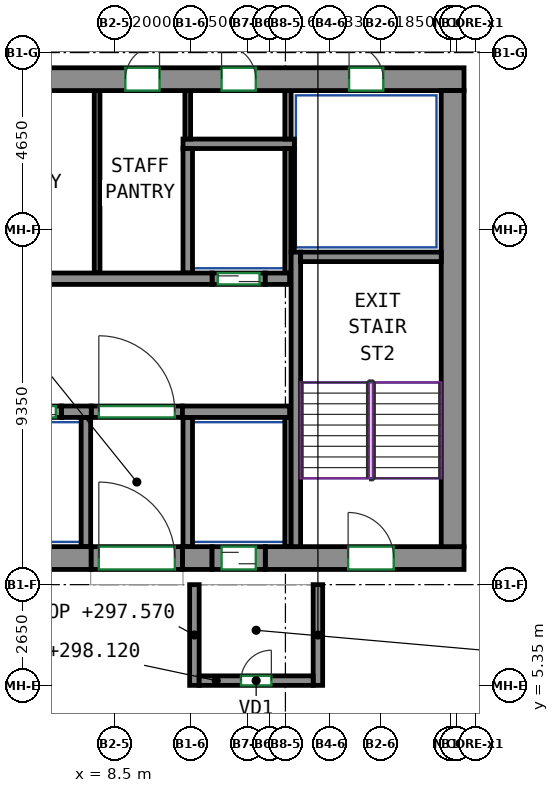
"""IFC4 building model, lengths in metres.
Left out: names, types, materials, properties, quantities, classifications, styles, units other than length and angle.
Written with IfcOpenShell. Run it as: python <this file> out.ifc"""

import sys

from ifc_helpers import new_model, si_unit, direction, frame, frame_2d, origin, place, context, subcontext, project, spatial, rectangle, extrude, source, transform, mapped, element, fill, save


model = new_model("IFC4")
c1 = context("Model", 3, precision=1e-05, world=origin(), true_north=direction((0.0, 1.0)))
c2 = subcontext(c1, "Body", "Model", "MODEL_VIEW")
j1 = project(units=[si_unit("LENGTHUNIT", "METRE"), si_unit("PLANEANGLEUNIT", "RADIAN")], contexts=[c1])
p1 = place(None, origin())
s1 = spatial("IfcSite", under=j1, at=p1, CompositionType="ELEMENT")
p2 = place(p1, origin())
s2 = spatial("IfcBuilding", under=s1, at=p2, CompositionType="ELEMENT")
p3 = place(p2, frame((0.0, 0.0, 295.0)))
s3 = spatial("IfcBuildingStorey", under=s2, at=p3, CompositionType="ELEMENT", Elevation=295.0)
m1 = source(origin(), c2, "Body", "SweptSolid", [
    extrude(rectangle(XDim=14.18, YDim=0.6, at=frame_2d((7.09, 0.0))), origin(), (0.0, 0.0, 1.0), 3.12),
])
p4 = place(p3, frame((-6.29, 8.7, 0.0), z_axis=(0.0, 0.0, 1.0), x_axis=(1.0, 0.0, 0.0)))
e1 = element("IfcWall", 1, at=p4, inside=s3, PredefinedType="SHEAR", context=c2, shape_type="MappedRepresentation", body=[
    mapped(m1, transform((0.0, 0.0, 0.0))),
])
m2 = source(origin(), c2, "Body", "SweptSolid", [
    extrude(rectangle(XDim=0.78, YDim=0.6, at=frame_2d((0.39, 0.0))), origin(), (0.0, 0.0, 1.0), 3.12),
])
p5 = place(p3, frame((10.29, 8.7, 0.0), z_axis=(0.0, 0.0, 1.0), x_axis=(1.0, 0.0, 0.0)))
e2 = element("IfcWall", 2, at=p5, inside=s3, PredefinedType="SHEAR", context=c2, shape_type="MappedRepresentation", body=[
    mapped(m2, transform((0.0, 0.0, 0.0))),
])
m3 = source(origin(), c2, "Body", "SweptSolid", [
    extrude(rectangle(XDim=5.23, YDim=0.6, at=frame_2d((2.615, 0.0))), origin(), (0.0, 0.0, 1.0), 3.12),
])
p6 = place(p3, frame((12.47, 8.7, 0.0), z_axis=(0.0, 0.0, 1.0), x_axis=(1.0, 0.0, 0.0)))
e3 = element("IfcWall", 3, at=p6, inside=s3, PredefinedType="SHEAR", context=c2, shape_type="MappedRepresentation", body=[
    mapped(m3, transform((0.0, 0.0, 0.0))),
])
p7 = place(p6, frame((2.18, 0.0, 0.0)))
e4 = element("IfcOpeningElement", 4, at=p7, cuts=e3, PredefinedType="OPENING", context=c2, shape_type="SweptSolid", body=[
    extrude(rectangle(XDim=1.2, YDim=2.1, at=frame_2d((0.6, 1.05))), frame((0.0, 0.31, 0.0), z_axis=(0.0, -1.0, 0.0), x_axis=(1.0, 0.0, 0.0)), (0.0, 0.0, 1.0), 0.62),
])
m4 = source(origin(), c2, "Body", "SweptSolid", [
    extrude(rectangle(XDim=33.3, YDim=0.6, at=frame_2d((16.65, 0.0))), origin(), (0.0, 0.0, 1.0), 3.12),
])
p8 = place(p3, frame((-15.6, 21.3, 0.0), z_axis=(0.0, 0.0, 1.0), x_axis=(1.0, 0.0, 0.0)))
e5 = element("IfcWall", 5, at=p8, inside=s3, PredefinedType="SHEAR", context=c2, shape_type="MappedRepresentation", body=[
    mapped(m4, transform((0.0, 0.0, 0.0))),
])
p9 = place(p8, frame((6.431, 0.0, 0.0)))
e6 = element("IfcOpeningElement", 6, at=p9, cuts=e5, PredefinedType="OPENING", context=c2, shape_type="SweptSolid", body=[
    extrude(rectangle(XDim=0.9, YDim=2.1, at=frame_2d((0.45, 1.05))), frame((0.0, 0.31, 0.0), z_axis=(0.0, -1.0, 0.0), x_axis=(1.0, 0.0, 0.0)), (0.0, 0.0, 1.0), 0.62),
])
p10 = place(p8, frame((11.738, 0.0, 0.0)))
e7 = element("IfcOpeningElement", 7, at=p10, cuts=e5, PredefinedType="OPENING", context=c2, shape_type="SweptSolid", body=[
    extrude(rectangle(XDim=0.9, YDim=2.1, at=frame_2d((0.45, 1.05))), frame((0.0, 0.31, 0.0), z_axis=(0.0, -1.0, 0.0), x_axis=(1.0, 0.0, 0.0)), (0.0, 0.0, 1.0), 0.62),
])
p11 = place(p8, frame((17.165, 0.0, 0.0)))
e8 = element("IfcOpeningElement", 8, at=p11, cuts=e5, PredefinedType="OPENING", context=c2, shape_type="SweptSolid", body=[
    extrude(rectangle(XDim=0.9, YDim=2.1, at=frame_2d((0.45, 1.05))), frame((0.0, 0.31, 0.0), z_axis=(0.0, -1.0, 0.0), x_axis=(1.0, 0.0, 0.0)), (0.0, 0.0, 1.0), 0.62),
])
p12 = place(p8, frame((21.386, 0.0, 0.0)))
e9 = element("IfcOpeningElement", 9, at=p12, cuts=e5, PredefinedType="OPENING", context=c2, shape_type="SweptSolid", body=[
    extrude(rectangle(XDim=0.9, YDim=2.1, at=frame_2d((0.45, 1.05))), frame((0.0, 0.31, 0.0), z_axis=(0.0, -1.0, 0.0), x_axis=(1.0, 0.0, 0.0)), (0.0, 0.0, 1.0), 0.62),
])
p13 = place(p8, frame((24.387, 0.0, 0.0)))
e10 = element("IfcOpeningElement", 10, at=p13, cuts=e5, PredefinedType="OPENING", context=c2, shape_type="SweptSolid", body=[
    extrude(rectangle(XDim=0.9, YDim=2.1, at=frame_2d((0.45, 1.05))), frame((0.0, 0.31, 0.0), z_axis=(0.0, -1.0, 0.0), x_axis=(1.0, 0.0, 0.0)), (0.0, 0.0, 1.0), 0.62),
])
p14 = place(p8, frame((26.92, 0.0, 0.0)))
e11 = element("IfcOpeningElement", 11, at=p14, cuts=e5, PredefinedType="OPENING", context=c2, shape_type="SweptSolid", body=[
    extrude(rectangle(XDim=0.9, YDim=2.1, at=frame_2d((0.45, 1.05))), frame((0.0, 0.31, 0.0), z_axis=(0.0, -1.0, 0.0), x_axis=(1.0, 0.0, 0.0)), (0.0, 0.0, 1.0), 0.62),
])
p15 = place(p8, frame((2.125, 0.0, 0.0)))
e12 = element("IfcOpeningElement", 12, at=p15, cuts=e5, PredefinedType="OPENING", context=c2, shape_type="SweptSolid", body=[
    extrude(rectangle(XDim=0.9, YDim=2.1, at=frame_2d((0.45, 1.05))), frame((0.0, 0.31, 0.0), z_axis=(0.0, -1.0, 0.0), x_axis=(1.0, 0.0, 0.0)), (0.0, 0.0, 1.0), 0.62),
])
p16 = place(p8, frame((30.275, 0.0, 0.0)))
e13 = element("IfcOpeningElement", 13, at=p16, cuts=e5, PredefinedType="OPENING", context=c2, shape_type="SweptSolid", body=[
    extrude(rectangle(XDim=0.9, YDim=2.1, at=frame_2d((0.45, 1.05))), frame((0.0, 0.31, 0.0), z_axis=(0.0, -1.0, 0.0), x_axis=(1.0, 0.0, 0.0)), (0.0, 0.0, 1.0), 0.62),
])
m5 = source(origin(), c2, "Body", "SweptSolid", [
    extrude(rectangle(XDim=12.0, YDim=0.6, at=frame_2d((6.0, 0.0))), origin(), (0.0, 0.0, 1.0), 3.12),
])
p17 = place(p3, frame((17.4, 9.0, 0.0), z_axis=(0.0, 0.0, 1.0), x_axis=(0.0, 1.0, 0.0)))
e14 = element("IfcWall", 14, at=p17, inside=s3, PredefinedType="SHEAR", context=c2, shape_type="MappedRepresentation", body=[
    mapped(m5, transform((0.0, 0.0, 0.0))),
])
m6 = source(origin(), c2, "Body", "SweptSolid", [
    extrude(rectangle(XDim=7.75, YDim=0.25, at=frame_2d((3.875, 0.0))), origin(), (0.0, 0.0, 1.0), 3.12),
])
p18 = place(p3, frame((13.275, 9.0, 0.0), z_axis=(0.0, 0.0, 1.0), x_axis=(0.0, 1.0, 0.0)))
e15 = element("IfcWall", 15, at=p18, inside=s3, PredefinedType="SHEAR", context=c2, shape_type="MappedRepresentation", body=[
    mapped(m6, transform((0.0, 0.0, 0.0))),
])
m7 = source(origin(), c2, "Body", "SweptSolid", [
    extrude(rectangle(XDim=3.7, YDim=0.25, at=frame_2d((1.85, 0.0))), origin(), (0.0, 0.0, 1.0), 3.12),
])
p19 = place(p3, frame((13.4, 16.625, 0.0), z_axis=(0.0, 0.0, 1.0), x_axis=(1.0, 0.0, 0.0)))
e16 = element("IfcWall", 16, at=p19, inside=s3, PredefinedType="SHEAR", context=c2, shape_type="MappedRepresentation", body=[
    mapped(m7, transform((0.0, 0.0, 0.0))),
])
m8 = source(origin(), c2, "Body", "SweptSolid", [
    extrude(rectangle(XDim=0.78, YDim=0.3, at=frame_2d((0.39, 0.0))), origin(), (0.0, 0.0, 1.0), 3.12),
])
p20 = place(p3, frame((7.11, 12.55, 0.0), z_axis=(0.0, 0.0, 1.0), x_axis=(1.0, 0.0, 0.0)))
e17 = element("IfcWall", 17, at=p20, inside=s3, PredefinedType="SHEAR", context=c2, shape_type="MappedRepresentation", body=[
    mapped(m8, transform((0.0, 0.0, 0.0))),
])
m9 = source(origin(), c2, "Body", "SweptSolid", [
    extrude(rectangle(XDim=2.82, YDim=0.3, at=frame_2d((1.41, 0.0))), origin(), (0.0, 0.0, 1.0), 3.12),
])
p21 = place(p3, frame((10.29, 12.55, 0.0), z_axis=(0.0, 0.0, 1.0), x_axis=(1.0, 0.0, 0.0)))
e18 = element("IfcWall", 18, at=p21, inside=s3, PredefinedType="SHEAR", context=c2, shape_type="MappedRepresentation", body=[
    mapped(m9, transform((0.0, 0.0, 0.0))),
])
m10 = source(origin(), c2, "Body", "SweptSolid", [
    extrude(rectangle(XDim=22.08, YDim=0.3, at=frame_2d((11.04, 0.0))), origin(), (0.0, 0.0, 1.0), 3.12),
])
p22 = place(p3, frame((-11.01, 16.05, 0.0), z_axis=(0.0, 0.0, 1.0), x_axis=(1.0, 0.0, 0.0)))
e19 = element("IfcWall", 19, at=p22, inside=s3, PredefinedType="SHEAR", context=c2, shape_type="MappedRepresentation", body=[
    mapped(m10, transform((0.0, 0.0, 0.0))),
])
m11 = source(origin(), c2, "Body", "SweptSolid", [
    extrude(rectangle(XDim=0.64, YDim=0.3, at=frame_2d((0.32, 0.0))), origin(), (0.0, 0.0, 1.0), 3.12),
])
p23 = place(p3, frame((12.47, 16.05, 0.0), z_axis=(0.0, 0.0, 1.0), x_axis=(1.0, 0.0, 0.0)))
e20 = element("IfcWall", 20, at=p23, inside=s3, PredefinedType="SHEAR", context=c2, shape_type="MappedRepresentation", body=[
    mapped(m11, transform((0.0, 0.0, 0.0))),
])
m12 = source(origin(), c2, "Body", "SweptSolid", [
    extrude(rectangle(XDim=1.4, YDim=0.3, at=frame_2d((0.7, 0.0))), origin(), (0.0, 0.0, 1.0), 3.12),
])
p24 = place(p3, frame((5.71, 12.55, 0.0), z_axis=(0.0, 0.0, 1.0), x_axis=(1.0, 0.0, 0.0)))
e21 = element("IfcWall", 21, at=p24, inside=s3, PredefinedType="PARTITIONING", context=c2, shape_type="MappedRepresentation", body=[
    mapped(m12, transform((0.0, 0.0, 0.0))),
])
p25 = place(p24, frame((0.15, 0.0, 0.0)))
e22 = element("IfcOpeningElement", 22, at=p25, cuts=e21, PredefinedType="OPENING", context=c2, shape_type="SweptSolid", body=[
    extrude(rectangle(XDim=1.1, YDim=2.1, at=frame_2d((0.55, 1.05))), frame((0.0, 0.16, 0.0), z_axis=(0.0, -1.0, 0.0), x_axis=(1.0, 0.0, 0.0)), (0.0, 0.0, 1.0), 0.32),
])
m13 = source(origin(), c2, "Body", "SweptSolid", [
    extrude(rectangle(XDim=1.4, YDim=0.3, at=frame_2d((0.7, 0.0))), origin(), (0.0, 0.0, 1.0), 3.12),
])
p26 = place(p3, frame((11.07, 16.05, 0.0), z_axis=(0.0, 0.0, 1.0), x_axis=(1.0, 0.0, 0.0)))
e23 = element("IfcWall", 23, at=p26, inside=s3, PredefinedType="PARTITIONING", context=c2, shape_type="MappedRepresentation", body=[
    mapped(m13, transform((0.0, 0.0, 0.0))),
])
p27 = place(p26, frame((0.15, 0.0, 0.0)))
e24 = element("IfcOpeningElement", 24, at=p27, cuts=e23, PredefinedType="OPENING", context=c2, shape_type="SweptSolid", body=[
    extrude(rectangle(XDim=1.1, YDim=2.1, at=frame_2d((0.55, 1.05))), frame((0.0, 0.16, 0.0), z_axis=(0.0, -1.0, 0.0), x_axis=(1.0, 0.0, 0.0)), (0.0, 0.0, 1.0), 0.32),
])
m14 = source(origin(), c2, "Body", "SweptSolid", [
    extrude(rectangle(XDim=2.4, YDim=0.3, at=frame_2d((1.2, 0.0))), origin(), (0.0, 0.0, 1.0), 3.12),
])
p28 = place(p3, frame((7.89, 12.55, 0.0), z_axis=(0.0, 0.0, 1.0), x_axis=(1.0, 0.0, 0.0)))
e25 = element("IfcWall", 25, at=p28, inside=s3, PredefinedType="PARTITIONING", context=c2, shape_type="MappedRepresentation", body=[
    mapped(m14, transform((0.0, 0.0, 0.0))),
])
p29 = place(p28, frame((0.2, 0.0, 0.0)))
e26 = element("IfcOpeningElement", 26, at=p29, cuts=e25, PredefinedType="OPENING", context=c2, shape_type="SweptSolid", body=[
    extrude(rectangle(XDim=2.0, YDim=2.1, at=frame_2d((1.0, 1.05))), frame((0.0, 0.16, 0.0), z_axis=(0.0, -1.0, 0.0), x_axis=(1.0, 0.0, 0.0)), (0.0, 0.0, 1.0), 0.32),
])
m15 = source(origin(), c2, "Body", "SweptSolid", [
    extrude(rectangle(XDim=2.65, YDim=0.25, at=frame_2d((1.325, 0.0))), origin(), (0.0, 0.0, 1.0), 2.57),
])
for number, where, z_axis, x_axis in (
    (27, (10.605, 5.35, 0.0), (0.0, 0.0, 1.0), (0.0, 1.0, 0.0)),
    (28, (13.855, 5.35, 0.0), (0.0, 0.0, 1.0), (0.0, 1.0, 0.0)),
):
    element("IfcWall", number, at=place(p3, frame(where, z_axis=z_axis, x_axis=x_axis)), inside=s3, PredefinedType="PARTITIONING", context=c2, shape_type="MappedRepresentation", body=[
        mapped(m15, transform((0.0, 0.0, 0.0))),
    ])
m16 = source(origin(), c2, "Body", "SweptSolid", [
    extrude(rectangle(XDim=3.0, YDim=0.25, at=frame_2d((1.5, 0.0))), origin(), (0.0, 0.0, 1.0), 3.12),
])
p30 = place(p3, frame((10.73, 5.475, 0.0), z_axis=(0.0, 0.0, 1.0), x_axis=(1.0, 0.0, 0.0)))
e29 = element("IfcWall", 29, at=p30, inside=s3, PredefinedType="PARTITIONING", context=c2, shape_type="MappedRepresentation", body=[
    mapped(m16, transform((0.0, 0.0, 0.0))),
])
p31 = place(p30, frame((1.1, 0.0, 0.0)))
e30 = element("IfcOpeningElement", 30, at=p31, cuts=e29, PredefinedType="OPENING", context=c2, shape_type="SweptSolid", body=[
    extrude(rectangle(XDim=0.8, YDim=2.0, at=frame_2d((0.4, 1.0))), frame((0.0, 0.135, 0.0), z_axis=(0.0, -1.0, 0.0), x_axis=(1.0, 0.0, 0.0)), (0.0, 0.0, 1.0), 0.27),
])
m17 = source(origin(), c2, "Body", "SweptSolid", [
    extrude(rectangle(XDim=2.93, YDim=0.25, at=frame_2d((1.465, 0.0))), origin(), (0.0, 0.0, 1.0), 3.12),
])
p32 = place(p3, frame((10.305, 19.6, 0.0), z_axis=(0.0, 0.0, 1.0), x_axis=(1.0, 0.0, 0.0)))
e31 = element("IfcWall", 31, at=p32, inside=s3, PredefinedType="PARTITIONING", context=c2, shape_type="MappedRepresentation", body=[
    mapped(m17, transform((0.0, 0.0, 0.0))),
])
m18 = source(origin(), c2, "Body", "SweptSolid", [
    extrude(rectangle(XDim=3.275, YDim=0.165, at=frame_2d((1.638, 0.0))), origin(), (0.0, 0.0, 1.0), 3.12),
])
p33 = place(p3, frame((13.067, 16.2, 0.0), z_axis=(0.0, 0.0, 1.0), x_axis=(0.0, 1.0, 0.0)))
e32 = element("IfcWall", 32, at=p33, inside=s3, PredefinedType="PARTITIONING", context=c2, shape_type="MappedRepresentation", body=[
    mapped(m18, transform((0.0, 0.0, 0.0))),
])
m19 = source(origin(), c2, "Body", "SweptSolid", [
    extrude(rectangle(XDim=1.275, YDim=0.165, at=frame_2d((0.637, 0.0))), origin(), (0.0, 0.0, 1.0), 3.12),
])
p34 = place(p3, frame((13.067, 19.725, 0.0), z_axis=(0.0, 0.0, 1.0), x_axis=(0.0, 1.0, 0.0)))
e33 = element("IfcWall", 33, at=p34, inside=s3, PredefinedType="PARTITIONING", context=c2, shape_type="MappedRepresentation", body=[
    mapped(m19, transform((0.0, 0.0, 0.0))),
])
m20 = source(origin(), c2, "Body", "SweptSolid", [
    extrude(rectangle(XDim=3.275, YDim=0.25, at=frame_2d((1.638, 0.0))), origin(), (0.0, 0.0, 1.0), 3.12),
])
p35 = place(p3, frame((10.43, 16.2, 0.0), z_axis=(0.0, 0.0, 1.0), x_axis=(0.0, 1.0, 0.0)))
e34 = element("IfcWall", 34, at=p35, inside=s3, PredefinedType="PARTITIONING", context=c2, shape_type="MappedRepresentation", body=[
    mapped(m20, transform((0.0, 0.0, 0.0))),
])
m21 = source(origin(), c2, "Body", "SweptSolid", [
    extrude(rectangle(XDim=2.725, YDim=0.085, at=frame_2d((1.363, 0.0))), origin(), (0.0, 0.0, 1.0), 3.12),
])
p36 = place(p3, frame((13.192, 16.75, 0.0), z_axis=(0.0, 0.0, 1.0), x_axis=(0.0, 1.0, 0.0)))
e35 = element("IfcWall", 35, at=p36, inside=s3, PredefinedType="PARTITIONING", context=c2, shape_type="MappedRepresentation", body=[
    mapped(m21, transform((0.0, 0.0, 0.0))),
])
m22 = source(origin(), c2, "Body", "SweptSolid", [
    extrude(rectangle(XDim=3.4, YDim=0.25, at=frame_2d((1.7, 0.0))), origin(), (0.0, 0.0, 1.0), 3.12),
])
p37 = place(p3, frame((10.43, 9.0, 0.0), z_axis=(0.0, 0.0, 1.0), x_axis=(0.0, 1.0, 0.0)))
e36 = element("IfcWall", 36, at=p37, inside=s3, PredefinedType="PARTITIONING", context=c2, shape_type="MappedRepresentation", body=[
    mapped(m22, transform((0.0, 0.0, 0.0))),
])
m23 = source(origin(), c2, "Body", "SweptSolid", [
    extrude(rectangle(XDim=3.4, YDim=0.165, at=frame_2d((1.7, 0.0))), origin(), (0.0, 0.0, 1.0), 3.12),
])
p38 = place(p3, frame((13.067, 9.0, 0.0), z_axis=(0.0, 0.0, 1.0), x_axis=(0.0, 1.0, 0.0)))
e37 = element("IfcWall", 37, at=p38, inside=s3, PredefinedType="PARTITIONING", context=c2, shape_type="MappedRepresentation", body=[
    mapped(m23, transform((0.0, 0.0, 0.0))),
])
p39 = place(p3, frame((7.75, 9.0, 0.0), z_axis=(0.0, 0.0, 1.0), x_axis=(0.0, 1.0, 0.0)))
e38 = element("IfcWall", 38, at=p39, inside=s3, PredefinedType="PARTITIONING", context=c2, shape_type="MappedRepresentation", body=[
    mapped(m22, transform((0.0, 0.0, 0.0))),
])
m24 = source(origin(), c2, "Body", "SweptSolid", [
    extrude(rectangle(XDim=4.8, YDim=0.15, at=frame_2d((2.4, 0.0))), origin(), (0.0, 0.0, 1.0), 3.12),
])
p40 = place(p3, frame((8.045, 16.2, 0.0), z_axis=(0.0, 0.0, 1.0), x_axis=(0.0, 1.0, 0.0)))
e39 = element("IfcWall", 39, at=p40, inside=s3, PredefinedType="PARTITIONING", context=c2, shape_type="MappedRepresentation", body=[
    mapped(m24, transform((0.0, 0.0, 0.0))),
])
m25 = source(origin(), c2, "Body", "SweptSolid", [
    extrude(rectangle(XDim=1.275, YDim=0.15, at=frame_2d((0.637, 0.0))), origin(), (0.0, 0.0, 1.0), 3.12),
])
p41 = place(p3, frame((10.43, 19.725, 0.0), z_axis=(0.0, 0.0, 1.0), x_axis=(0.0, 1.0, 0.0)))
e40 = element("IfcWall", 40, at=p41, inside=s3, PredefinedType="PARTITIONING", context=c2, shape_type="MappedRepresentation", body=[
    mapped(m25, transform((0.0, 0.0, 0.0))),
])
m26 = source(origin(), c2, "Body", "SweptSolid", [
    extrude(rectangle(XDim=2.4, YDim=0.6, at=frame_2d((1.2, 0.0))), origin(), (0.0, 0.0, 1.0), 2.7),
])
p42 = place(p3, frame((7.89, 8.7, 0.0), z_axis=(0.0, 0.0, 1.0), x_axis=(1.0, 0.0, 0.0)))
e41 = element("IfcWall", 41, at=p42, inside=s3, PredefinedType="PARTITIONING", context=c2, shape_type="MappedRepresentation", body=[
    mapped(m26, transform((0.0, 0.0, 0.0))),
])
p43 = place(p42, frame((0.2, 0.0, 0.0)))
e42 = element("IfcOpeningElement", 42, at=p43, cuts=e41, PredefinedType="OPENING", context=c2, shape_type="SweptSolid", body=[
    extrude(rectangle(XDim=2.0, YDim=2.1, at=frame_2d((1.0, 1.05))), frame((0.0, 0.31, 0.0), z_axis=(0.0, -1.0, 0.0), x_axis=(1.0, 0.0, 0.0)), (0.0, 0.0, 1.0), 0.62),
])
m27 = source(origin(), c2, "Body", "SweptSolid", [
    extrude(rectangle(XDim=1.4, YDim=0.6, at=frame_2d((0.7, 0.0))), origin(), (0.0, 0.0, 1.0), 2.7),
])
p44 = place(p3, frame((11.07, 8.7, 0.0), z_axis=(0.0, 0.0, 1.0), x_axis=(1.0, 0.0, 0.0)))
e43 = element("IfcWall", 43, at=p44, inside=s3, PredefinedType="PARTITIONING", context=c2, shape_type="MappedRepresentation", body=[
    mapped(m27, transform((0.0, 0.0, 0.0))),
])
p45 = place(p44, frame((0.25, 0.0, 0.0)))
e44 = element("IfcOpeningElement", 44, at=p45, cuts=e43, PredefinedType="OPENING", context=c2, shape_type="SweptSolid", body=[
    extrude(rectangle(XDim=0.9, YDim=2.1, at=frame_2d((0.45, 1.05))), frame((0.0, 0.31, 0.0), z_axis=(0.0, -1.0, 0.0), x_axis=(1.0, 0.0, 0.0)), (0.0, 0.0, 1.0), 0.62),
])
p46 = place(p29, origin())
e45 = element("IfcDoor", 45, at=p46, inside=s3, OperationType="DOUBLE_DOOR_SINGLE_SWING", PredefinedType="DOOR", context=c2, shape_type="SweptSolid", body=[
    extrude(rectangle(XDim=2.0, YDim=2.1, at=frame_2d((1.0, 1.05))), frame((0.0, 0.025, 0.0), z_axis=(0.0, -1.0, 0.0), x_axis=(1.0, 0.0, 0.0)), (0.0, 0.0, 1.0), 0.05),
])
fill(e26, e45)
p47 = place(p43, origin())
e46 = element("IfcDoor", 46, at=p47, inside=s3, OperationType="DOUBLE_DOOR_SINGLE_SWING", PredefinedType="DOOR", context=c2, shape_type="SweptSolid", body=[
    extrude(rectangle(XDim=2.0, YDim=2.1, at=frame_2d((1.0, 1.05))), frame((0.0, 0.205, 0.0), z_axis=(0.0, -1.0, 0.0), x_axis=(1.0, 0.0, 0.0)), (0.0, 0.0, 1.0), 0.05),
])
fill(e42, e46)
p48 = place(p31, origin())
e47 = element("IfcDoor", 47, at=p48, inside=s3, OperationType="SINGLE_SWING_RIGHT", PredefinedType="DOOR", context=c2, shape_type="SweptSolid", body=[
    extrude(rectangle(XDim=0.8, YDim=2.0, at=frame_2d((0.4, 1.0))), frame((0.0, 0.025, 0.0), z_axis=(0.0, -1.0, 0.0), x_axis=(1.0, 0.0, 0.0)), (0.0, 0.0, 1.0), 0.05),
])
fill(e30, e47)
p49 = place(p45, origin())
e48 = element("IfcDoor", 48, at=p49, inside=s3, OperationType="SLIDING_TO_LEFT", PredefinedType="DOOR", context=c2, shape_type="SweptSolid", body=[
    extrude(rectangle(XDim=0.9, YDim=2.1, at=frame_2d((0.45, 1.05))), frame((0.0, 0.205, 0.0), z_axis=(0.0, -1.0, 0.0), x_axis=(1.0, 0.0, 0.0)), (0.0, 0.0, 1.0), 0.05),
])
fill(e44, e48)
p50 = place(p25, origin())
e49 = element("IfcDoor", 49, at=p50, inside=s3, OperationType="DOUBLE_DOOR_SLIDING", PredefinedType="DOOR", context=c2, shape_type="SweptSolid", body=[
    extrude(rectangle(XDim=1.1, YDim=2.1, at=frame_2d((0.55, 1.05))), frame((0.0, 0.025, 0.0), z_axis=(0.0, -1.0, 0.0), x_axis=(1.0, 0.0, 0.0)), (0.0, 0.0, 1.0), 0.05),
])
fill(e22, e49)
p51 = place(p27, origin())
e50 = element("IfcDoor", 50, at=p51, inside=s3, OperationType="DOUBLE_DOOR_SLIDING", PredefinedType="DOOR", context=c2, shape_type="SweptSolid", body=[
    extrude(rectangle(XDim=1.1, YDim=2.1, at=frame_2d((0.55, 1.05))), frame((0.0, 0.025, 0.0), z_axis=(0.0, -1.0, 0.0), x_axis=(1.0, 0.0, 0.0)), (0.0, 0.0, 1.0), 0.05),
])
fill(e24, e50)
p52 = place(p13, origin())
e51 = element("IfcDoor", 51, at=p52, inside=s3, OperationType="SINGLE_SWING_RIGHT", PredefinedType="DOOR", context=c2, shape_type="SweptSolid", body=[
    extrude(rectangle(XDim=0.9, YDim=2.1, at=frame_2d((0.45, 1.05))), frame((0.0, -0.155, 0.0), z_axis=(0.0, -1.0, 0.0), x_axis=(1.0, 0.0, 0.0)), (0.0, 0.0, 1.0), 0.05),
])
fill(e10, e51)
p53 = place(p14, origin())
e52 = element("IfcDoor", 52, at=p53, inside=s3, OperationType="SINGLE_SWING_LEFT", PredefinedType="DOOR", context=c2, shape_type="SweptSolid", body=[
    extrude(rectangle(XDim=0.9, YDim=2.1, at=frame_2d((0.45, 1.05))), frame((0.0, -0.155, 0.0), z_axis=(0.0, -1.0, 0.0), x_axis=(1.0, 0.0, 0.0)), (0.0, 0.0, 1.0), 0.05),
])
fill(e11, e52)
p54 = place(p16, origin())
e53 = element("IfcDoor", 53, at=p54, inside=s3, OperationType="SINGLE_SWING_LEFT", PredefinedType="DOOR", context=c2, shape_type="SweptSolid", body=[
    extrude(rectangle(XDim=0.9, YDim=2.1, at=frame_2d((0.45, 1.05))), frame((0.0, -0.155, 0.0), z_axis=(0.0, -1.0, 0.0), x_axis=(1.0, 0.0, 0.0)), (0.0, 0.0, 1.0), 0.05),
])
fill(e13, e53)
p55 = place(p7, origin())
e54 = element("IfcDoor", 54, at=p55, inside=s3, OperationType="DOUBLE_DOOR_SINGLE_SWING", PredefinedType="DOOR", context=c2, shape_type="SweptSolid", body=[
    extrude(rectangle(XDim=1.2, YDim=2.1, at=frame_2d((0.6, 1.05))), frame((0.0, 0.205, 0.0), z_axis=(0.0, -1.0, 0.0), x_axis=(1.0, 0.0, 0.0)), (0.0, 0.0, 1.0), 0.05),
])
fill(e4, e54)
save(model, sys.argv[1])
